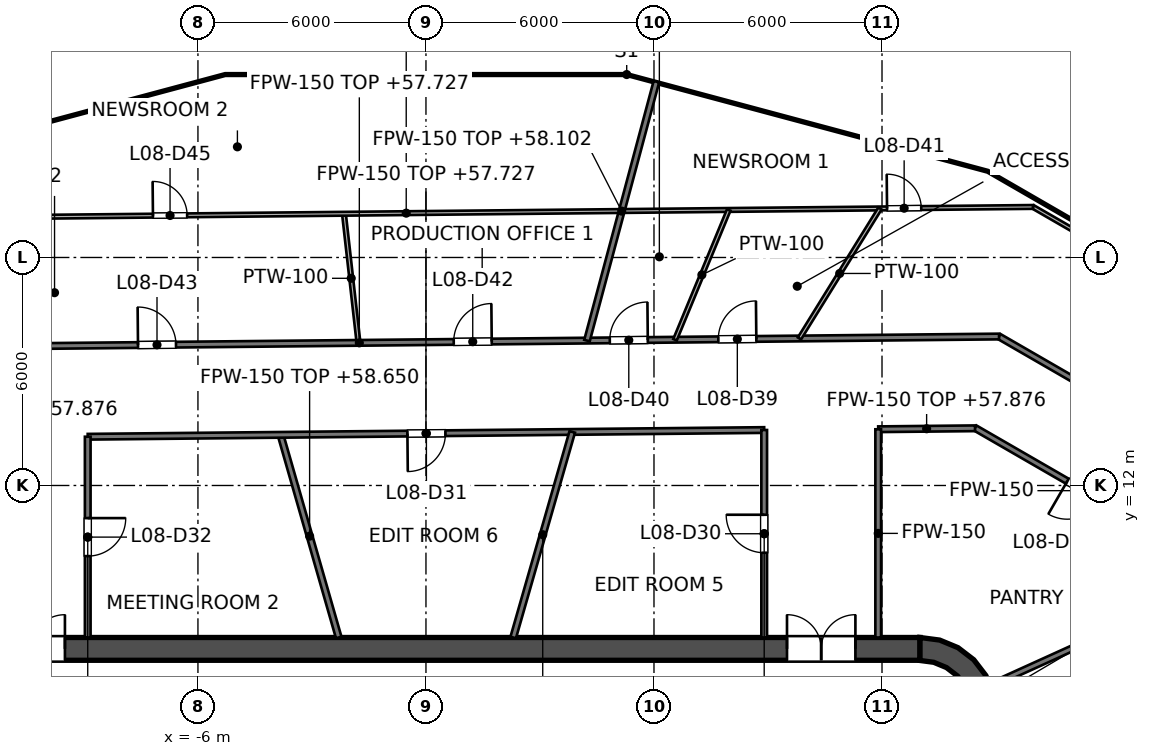
"""IFC4 building model, lengths in metres.
Left out: names, types, materials, properties, quantities, classifications, styles, units other than length and angle.
Written with IfcOpenShell. Run it as: python <this file> out.ifc"""

import sys

from ifc_helpers import new_model, si_unit, direction, frame, frame_2d, origin, place, context, subcontext, project, spatial, polyline, rectangle, outline, extrude, element, fill, save


model = new_model("IFC4")
c1 = context("Model", 3, precision=1e-05, world=origin(), true_north=direction((0.0, 1.0)))
c2 = subcontext(c1, "Body", "Model", "MODEL_VIEW")
j1 = project(units=[si_unit("LENGTHUNIT", "METRE"), si_unit("PLANEANGLEUNIT", "RADIAN")], contexts=[c1])
p1 = place(None, origin())
s1 = spatial("IfcSite", under=j1, at=p1, CompositionType="ELEMENT")
p2 = place(p1, origin())
s2 = spatial("IfcBuilding", under=s1, at=p2, CompositionType="ELEMENT")
p3 = place(p2, frame((0.0, 0.0, 54.6)))
s3 = spatial("IfcBuildingStorey", under=s2, at=p3, CompositionType="ELEMENT", Elevation=54.6)
p4 = place(p3, frame((-13.0, 7.7, 0.0), z_axis=(0.0, 0.0, 1.0), x_axis=(1.0, 0.0, 0.0)))
e1 = element("IfcWall", 1, at=p4, inside=s3, PredefinedType="SHEAR", context=c2, shape_type="SweptSolid", body=[
    extrude(rectangle(XDim=26.0, YDim=0.6, at=frame_2d((13.0, 0.0))), origin(), (0.0, 0.0, 1.0), 4.2),
])
p5 = place(p4, frame((1.7, 0.0, 0.0)))
e2 = element("IfcOpeningElement", 2, at=p5, cuts=e1, PredefinedType="OPENING", context=c2, shape_type="SweptSolid", body=[
    extrude(rectangle(XDim=1.8, YDim=2.1, at=frame_2d((0.9, 1.05))), frame((0.0, 0.3, 0.0), z_axis=(0.0, -1.0, 0.0), x_axis=(1.0, 0.0, 0.0)), (0.0, 0.0, 1.0), 0.6),
])
p6 = place(p4, frame((22.5, 0.0, 0.0)))
e3 = element("IfcOpeningElement", 3, at=p6, cuts=e1, PredefinedType="OPENING", context=c2, shape_type="SweptSolid", body=[
    extrude(rectangle(XDim=1.8, YDim=2.1, at=frame_2d((0.9, 1.05))), frame((0.0, 0.3, 0.0), z_axis=(0.0, -1.0, 0.0), x_axis=(1.0, 0.0, 0.0)), (0.0, 0.0, 1.0), 0.6),
])
p7 = place(p3, origin())
e4 = element("IfcWall", 4, at=p7, inside=s3, PredefinedType="SHEAR", context=c2, shape_type="SweptSolid", body=[
    extrude(outline(polyline([(13.0, 8.0), (13.0, 7.395), (13.361, 7.347), (13.698, 7.208), (13.986, 6.986), (14.208, 6.698), (14.347, 6.361), (14.395, 6.0), (15.0, 6.0), (14.932, 6.518), (14.732, 7.0), (14.414, 7.414), (14.0, 7.732), (13.518, 7.932), (13.0, 8.0)])), origin(), (0.0, 0.0, 1.0), 4.2),
])
p8 = place(p3, frame((-9.125, 7.0, 0.0), z_axis=(0.0, 0.0, 1.0), x_axis=(1.0, 0.0, 0.0)))
e5 = element("IfcWall", 5, at=p8, inside=s3, PredefinedType="SOLIDWALL", context=c2, shape_type="SweptSolid", body=[
    extrude(rectangle(XDim=18.25, YDim=0.8, at=frame_2d((9.125, 0.0))), origin(), (0.0, 0.0, 1.0), 4.05),
])
p9 = place(p3, frame((11.8, -7.4, 0.0), z_axis=(0.0, 0.0, 1.0), x_axis=(0.0, 1.0, 0.0)))
e6 = element("IfcWall", 6, at=p9, inside=s3, PredefinedType="SOLIDWALL", context=c2, shape_type="SweptSolid", body=[
    extrude(rectangle(XDim=14.8, YDim=0.4, at=frame_2d((7.4, 0.0))), origin(), (0.0, 0.0, 1.0), 4.05),
])
p10 = place(p9, frame((11.2, 0.0, 0.0)))
e7 = element("IfcOpeningElement", 7, at=p10, cuts=e6, PredefinedType="OPENING", context=c2, shape_type="SweptSolid", body=[
    extrude(rectangle(XDim=1.1, YDim=2.1, at=frame_2d((0.55, 1.05))), frame((0.0, 0.2, 0.0), z_axis=(0.0, -1.0, 0.0), x_axis=(1.0, 0.0, 0.0)), (0.0, 0.0, 1.0), 0.4),
])
p11 = place(p9, frame((8.3, 0.0, 0.0)))
e8 = element("IfcOpeningElement", 8, at=p11, cuts=e6, PredefinedType="OPENING", context=c2, shape_type="SweptSolid", body=[
    extrude(rectangle(XDim=1.1, YDim=2.1, at=frame_2d((0.55, 1.05))), frame((0.0, 0.2, 0.0), z_axis=(0.0, -1.0, 0.0), x_axis=(1.0, 0.0, 0.0)), (0.0, 0.0, 1.0), 0.4),
])
p12 = place(p9, frame((5.4, 0.0, 0.0)))
e9 = element("IfcOpeningElement", 9, at=p12, cuts=e6, PredefinedType="OPENING", context=c2, shape_type="SweptSolid", body=[
    extrude(rectangle(XDim=1.1, YDim=2.1, at=frame_2d((0.55, 1.05))), frame((0.0, 0.2, 0.0), z_axis=(0.0, -1.0, 0.0), x_axis=(1.0, 0.0, 0.0)), (0.0, 0.0, 1.0), 0.4),
])
p13 = place(p9, frame((13.552, 0.0, 0.0)))
e10 = element("IfcOpeningElement", 10, at=p13, cuts=e6, PredefinedType="OPENING", context=c2, shape_type="SweptSolid", body=[
    extrude(rectangle(XDim=0.9, YDim=2.1, at=frame_2d((0.45, 1.05))), frame((0.0, 0.2, 0.0), z_axis=(0.0, -1.0, 0.0), x_axis=(1.0, 0.0, 0.0)), (0.0, 0.0, 1.0), 0.4),
])
p14 = place(p9, frame((0.347, 0.0, 0.0)))
e11 = element("IfcOpeningElement", 11, at=p14, cuts=e6, PredefinedType="OPENING", context=c2, shape_type="SweptSolid", body=[
    extrude(rectangle(XDim=0.9, YDim=2.1, at=frame_2d((0.45, 1.05))), frame((0.0, 0.2, 0.0), z_axis=(0.0, -1.0, 0.0), x_axis=(1.0, 0.0, 0.0)), (0.0, 0.0, 1.0), 0.4),
])
p15 = place(p3, frame((-3.827, 13.333, 0.0), z_axis=(0.0, 0.0, 1.0), x_axis=(0.275935525478, -0.961176147113, 0.0)))
e12 = element("IfcWall", 12, at=p15, inside=s3, PredefinedType="PARTITIONING", context=c2, shape_type="SweptSolid", body=[
    extrude(rectangle(XDim=5.548, YDim=0.15, at=frame_2d((2.774, 0.0))), origin(), (0.0, 0.0, 1.0), 4.05),
])
p16 = place(p3, frame((14.448, 13.515, 0.0), z_axis=(0.0, 0.0, 1.0), x_axis=(0.865975016585, -0.500087263036, 0.0)))
e13 = element("IfcWall", 13, at=p16, inside=s3, PredefinedType="PARTITIONING", context=c2, shape_type="SweptSolid", body=[
    extrude(rectangle(XDim=6.604, YDim=0.15, at=frame_2d((3.302, 0.0))), origin(), (0.0, 0.0, 1.0), 3.195),
])
p17 = place(p16, frame((2.804, 0.0, 0.0)))
e14 = element("IfcOpeningElement", 14, at=p17, cuts=e13, PredefinedType="OPENING", context=c2, shape_type="SweptSolid", body=[
    extrude(rectangle(XDim=1.0, YDim=2.1, at=frame_2d((0.5, 1.05))), frame((0.0, 0.075, 0.0), z_axis=(0.0, -1.0, 0.0), x_axis=(1.0, 0.0, 0.0)), (0.0, 0.0, 1.0), 0.15),
])
p18 = place(p3, frame((15.08, 15.921, 0.0), z_axis=(0.0, 0.0, 1.0), x_axis=(0.865969836028, -0.500096233828, 0.0)))
e15 = element("IfcWall", 15, at=p18, inside=s3, PredefinedType="PARTITIONING", context=c2, shape_type="SweptSolid", body=[
    extrude(rectangle(XDim=8.613, YDim=0.15, at=frame_2d((4.306, 0.0))), origin(), (0.0, 0.0, 1.0), 3.195),
])
p19 = place(p18, frame((3.409, 0.0, 0.0)))
e16 = element("IfcOpeningElement", 16, at=p19, cuts=e15, PredefinedType="OPENING", context=c2, shape_type="SweptSolid", body=[
    extrude(rectangle(XDim=1.2, YDim=2.1, at=frame_2d((0.6, 1.05))), frame((0.0, 0.075, 0.0), z_axis=(0.0, -1.0, 0.0), x_axis=(1.0, 0.0, 0.0)), (0.0, 0.0, 1.0), 0.15),
])
p20 = place(p3, frame((-8.9, 13.282, 0.0), z_axis=(0.0, 0.0, 1.0), x_axis=(0.999950834077, 0.009916119672, 0.0)))
e17 = element("IfcWall", 17, at=p20, inside=s3, PredefinedType="PARTITIONING", context=c2, shape_type="SweptSolid", body=[
    extrude(rectangle(XDim=17.801, YDim=0.15, at=frame_2d((8.9, 0.0))), origin(), (0.0, 0.0, 1.0), 3.127),
])
p21 = place(p20, frame((8.412, 0.0, 0.0)))
e18 = element("IfcOpeningElement", 18, at=p21, cuts=e17, PredefinedType="OPENING", context=c2, shape_type="SweptSolid", body=[
    extrude(rectangle(XDim=1.0, YDim=2.1, at=frame_2d((0.5, 1.05))), frame((0.0, 0.075, 0.0), z_axis=(0.0, -1.0, 0.0), x_axis=(1.0, 0.0, 0.0)), (0.0, 0.0, 1.0), 0.15),
])
p22 = place(p3, frame((11.9, 13.48, 0.0), z_axis=(0.0, 0.0, 1.0), x_axis=(0.999950357576, 0.009964054536, 0.0)))
e19 = element("IfcWall", 19, at=p22, inside=s3, PredefinedType="PARTITIONING", context=c2, shape_type="SweptSolid", body=[
    extrude(rectangle(XDim=2.548, YDim=0.15, at=frame_2d((1.274, 0.0))), origin(), (0.0, 0.0, 1.0), 3.276),
])
p23 = place(p3, frame((-18.587, 15.586, 0.0), z_axis=(0.0, 0.0, 1.0), x_axis=(0.99995087003, 0.009912493396, 0.0)))
e20 = element("IfcWall", 20, at=p23, inside=s3, PredefinedType="PARTITIONING", context=c2, shape_type="SweptSolid", body=[
    extrude(rectangle(XDim=33.669, YDim=0.15, at=frame_2d((16.834, 0.0))), origin(), (0.0, 0.0, 1.0), 3.127),
])
p24 = place(p23, frame((26.281, 0.0, 0.0)))
e21 = element("IfcOpeningElement", 21, at=p24, cuts=e20, PredefinedType="OPENING", context=c2, shape_type="SweptSolid", body=[
    extrude(rectangle(XDim=1.0, YDim=2.1, at=frame_2d((0.5, 1.05))), frame((0.0, 0.075, 0.0), z_axis=(0.0, -1.0, 0.0), x_axis=(1.0, 0.0, 0.0)), (0.0, 0.0, 1.0), 0.15),
])
p25 = place(p23, frame((23.425, 0.0, 0.0)))
e22 = element("IfcOpeningElement", 22, at=p25, cuts=e20, PredefinedType="OPENING", context=c2, shape_type="SweptSolid", body=[
    extrude(rectangle(XDim=1.0, YDim=2.1, at=frame_2d((0.5, 1.05))), frame((0.0, 0.075, 0.0), z_axis=(0.0, -1.0, 0.0), x_axis=(1.0, 0.0, 0.0)), (0.0, 0.0, 1.0), 0.15),
])
p26 = place(p23, frame((19.319, 0.0, 0.0)))
e23 = element("IfcOpeningElement", 23, at=p26, cuts=e20, PredefinedType="OPENING", context=c2, shape_type="SweptSolid", body=[
    extrude(rectangle(XDim=1.0, YDim=2.1, at=frame_2d((0.5, 1.05))), frame((0.0, 0.075, 0.0), z_axis=(0.0, -1.0, 0.0), x_axis=(1.0, 0.0, 0.0)), (0.0, 0.0, 1.0), 0.15),
])
p27 = place(p23, frame((11.01, 0.0, 0.0)))
e24 = element("IfcOpeningElement", 24, at=p27, cuts=e20, PredefinedType="OPENING", context=c2, shape_type="SweptSolid", body=[
    extrude(rectangle(XDim=1.0, YDim=2.1, at=frame_2d((0.5, 1.05))), frame((0.0, 0.075, 0.0), z_axis=(0.0, -1.0, 0.0), x_axis=(1.0, 0.0, 0.0)), (0.0, 0.0, 1.0), 0.15),
])
p28 = place(p23, frame((2.504, 0.0, 0.0)))
e25 = element("IfcOpeningElement", 25, at=p28, cuts=e20, PredefinedType="OPENING", context=c2, shape_type="SweptSolid", body=[
    extrude(rectangle(XDim=1.0, YDim=2.1, at=frame_2d((0.5, 1.05))), frame((0.0, 0.075, 0.0), z_axis=(0.0, -1.0, 0.0), x_axis=(1.0, 0.0, 0.0)), (0.0, 0.0, 1.0), 0.15),
])
p29 = place(p3, frame((14.843, 6.733, 0.0), z_axis=(0.0, 0.0, 1.0), x_axis=(0.910628361306, 0.413226315214, 0.0)))
e26 = element("IfcWall", 26, at=p29, inside=s3, PredefinedType="PARTITIONING", context=c2, shape_type="SweptSolid", body=[
    extrude(rectangle(XDim=5.87, YDim=0.15, at=frame_2d((2.935, 0.0))), origin(), (0.0, 0.0, 1.0), 4.05),
])
p30 = place(p3, frame((2.296, 8.0, 0.0), z_axis=(0.0, 0.0, 1.0), x_axis=(0.275958345059, 0.961169595749, 0.0)))
e27 = element("IfcWall", 27, at=p30, inside=s3, PredefinedType="PARTITIONING", context=c2, shape_type="SweptSolid", body=[
    extrude(rectangle(XDim=5.628, YDim=0.15, at=frame_2d((2.814, 0.0))), origin(), (0.0, 0.0, 1.0), 4.05),
])
p31 = place(p3, frame((4.237, 15.813, 0.0), z_axis=(0.0, 0.0, 1.0), x_axis=(0.258871033447, 0.965911894555, 0.0)))
e28 = element("IfcWall", 28, at=p31, inside=s3, PredefinedType="PARTITIONING", context=c2, shape_type="SweptSolid", body=[
    extrude(rectangle(XDim=7.053, YDim=0.15, at=frame_2d((3.527, 0.0))), origin(), (0.0, 0.0, 1.0), 3.501),
])
p32 = place(p3, frame((11.9, 8.0, 0.0), z_axis=(0.0, 0.0, 1.0), x_axis=(0.0, 1.0, 0.0)))
e29 = element("IfcWall", 29, at=p32, inside=s3, PredefinedType="PARTITIONING", context=c2, shape_type="SweptSolid", body=[
    extrude(rectangle(XDim=5.479, YDim=0.15, at=frame_2d((2.74, 0.0))), origin(), (0.0, 0.0, 1.0), 3.195),
])
p33 = place(p3, frame((8.9, 8.0, 0.0), z_axis=(0.0, 0.0, 1.0), x_axis=(0.0, 1.0, 0.0)))
e30 = element("IfcWall", 30, at=p33, inside=s3, PredefinedType="PARTITIONING", context=c2, shape_type="SweptSolid", body=[
    extrude(rectangle(XDim=5.46, YDim=0.15, at=frame_2d((2.73, 0.0))), origin(), (0.0, 0.0, 1.0), 3.127),
])
p34 = place(p33, frame((2.23, 0.0, 0.0)))
e31 = element("IfcOpeningElement", 31, at=p34, cuts=e30, PredefinedType="OPENING", context=c2, shape_type="SweptSolid", body=[
    extrude(rectangle(XDim=1.0, YDim=2.1, at=frame_2d((0.5, 1.05))), frame((0.0, 0.075, 0.0), z_axis=(0.0, -1.0, 0.0), x_axis=(1.0, 0.0, 0.0)), (0.0, 0.0, 1.0), 0.15),
])
p35 = place(p3, frame((-8.9, 8.0, 0.0), z_axis=(0.0, 0.0, 1.0), x_axis=(0.0, 1.0, 0.0)))
e32 = element("IfcWall", 32, at=p35, inside=s3, PredefinedType="PARTITIONING", context=c2, shape_type="SweptSolid", body=[
    extrude(rectangle(XDim=5.283, YDim=0.15, at=frame_2d((2.642, 0.0))), origin(), (0.0, 0.0, 1.0), 3.127),
])
p36 = place(p35, frame((2.142, 0.0, 0.0)))
e33 = element("IfcOpeningElement", 33, at=p36, cuts=e32, PredefinedType="OPENING", context=c2, shape_type="SweptSolid", body=[
    extrude(rectangle(XDim=1.0, YDim=2.1, at=frame_2d((0.5, 1.05))), frame((0.0, 0.075, 0.0), z_axis=(0.0, -1.0, 0.0), x_axis=(1.0, 0.0, 0.0)), (0.0, 0.0, 1.0), 0.15),
])
p37 = place(p3, frame((-2.158, 19.15, 0.0), z_axis=(0.0, 0.0, 1.0), x_axis=(0.112085765887, -0.993698536321, 0.0)))
e34 = element("IfcWall", 34, at=p37, inside=s3, PredefinedType="PARTITIONING", context=c2, shape_type="SweptSolid", body=[
    extrude(rectangle(XDim=3.417, YDim=0.1, at=frame_2d((1.709, 0.0))), origin(), (0.0, 0.0, 1.0), 4.05),
])
p38 = place(p3, frame((15.975, 19.33, 0.0), z_axis=(0.0, 0.0, 1.0), x_axis=(0.866006425355, -0.500032870163, 0.0)))
e35 = element("IfcWall", 35, at=p38, inside=s3, PredefinedType="PARTITIONING", context=c2, shape_type="SweptSolid", body=[
    extrude(rectangle(XDim=7.58, YDim=0.1, at=frame_2d((3.79, 0.0))), origin(), (0.0, 0.0, 1.0), 3.195),
])
p39 = place(p3, frame((-17.014, 19.003, 0.0), z_axis=(0.0, 0.0, 1.0), x_axis=(0.99995097792, 0.009901603787, 0.0)))
e36 = element("IfcWall", 36, at=p39, inside=s3, PredefinedType="PARTITIONING", context=c2, shape_type="SweptSolid", body=[
    extrude(rectangle(XDim=32.991, YDim=0.1, at=frame_2d((16.495, 0.0))), origin(), (0.0, 0.0, 1.0), 3.127),
])
p40 = place(p39, frame((29.148, 0.0, 0.0)))
e37 = element("IfcOpeningElement", 37, at=p40, cuts=e36, PredefinedType="OPENING", context=c2, shape_type="SweptSolid", body=[
    extrude(rectangle(XDim=0.9, YDim=2.1, at=frame_2d((0.45, 1.05))), frame((0.0, 0.05, 0.0), z_axis=(0.0, -1.0, 0.0), x_axis=(1.0, 0.0, 0.0)), (0.0, 0.0, 1.0), 0.1),
])
p41 = place(p39, frame((9.831, 0.0, 0.0)))
e38 = element("IfcOpeningElement", 38, at=p41, cuts=e36, PredefinedType="OPENING", context=c2, shape_type="SweptSolid", body=[
    extrude(rectangle(XDim=0.9, YDim=2.1, at=frame_2d((0.45, 1.05))), frame((0.0, 0.05, 0.0), z_axis=(0.0, -1.0, 0.0), x_axis=(1.0, 0.0, 0.0)), (0.0, 0.0, 1.0), 0.1),
])
p42 = place(p3, frame((9.827, 15.869, 0.0), z_axis=(0.0, 0.0, 1.0), x_axis=(0.526586421173, 0.850121603675, 0.0)))
e39 = element("IfcWall", 39, at=p42, inside=s3, PredefinedType="PARTITIONING", context=c2, shape_type="SweptSolid", body=[
    extrude(rectangle(XDim=4.024, YDim=0.1, at=frame_2d((2.012, 0.0))), origin(), (0.0, 0.0, 1.0), 4.05),
])
p43 = place(p3, frame((6.554, 15.836, 0.0), z_axis=(0.0, 0.0, 1.0), x_axis=(0.382344013287, 0.924020051462, 0.0)))
e40 = element("IfcWall", 40, at=p43, inside=s3, PredefinedType="PARTITIONING", context=c2, shape_type="SweptSolid", body=[
    extrude(rectangle(XDim=3.696, YDim=0.1, at=frame_2d((1.848, 0.0))), origin(), (0.0, 0.0, 1.0), 4.05),
])
p44 = place(p13, origin())
e41 = element("IfcDoor", 41, at=p44, inside=s3, OperationType="SINGLE_SWING_RIGHT", PredefinedType="DOOR", context=c2, shape_type="SweptSolid", body=[
    extrude(rectangle(XDim=0.9, YDim=2.1, at=frame_2d((0.45, 1.05))), frame((0.0, 0.025, 0.0), z_axis=(0.0, -1.0, 0.0), x_axis=(1.0, 0.0, 0.0)), (0.0, 0.0, 1.0), 0.05),
])
fill(e10, e41)
p45 = place(p5, origin())
e42 = element("IfcDoor", 42, at=p45, inside=s3, OperationType="DOUBLE_DOOR_SINGLE_SWING", PredefinedType="DOOR", context=c2, shape_type="SweptSolid", body=[
    extrude(rectangle(XDim=1.8, YDim=2.1, at=frame_2d((0.9, 1.05))), frame((0.0, 0.025, 0.0), z_axis=(0.0, -1.0, 0.0), x_axis=(1.0, 0.0, 0.0)), (0.0, 0.0, 1.0), 0.05),
])
fill(e2, e42)
p46 = place(p6, origin())
e43 = element("IfcDoor", 43, at=p46, inside=s3, OperationType="DOUBLE_DOOR_SINGLE_SWING", PredefinedType="DOOR", context=c2, shape_type="SweptSolid", body=[
    extrude(rectangle(XDim=1.8, YDim=2.1, at=frame_2d((0.9, 1.05))), frame((0.0, 0.025, 0.0), z_axis=(0.0, -1.0, 0.0), x_axis=(1.0, 0.0, 0.0)), (0.0, 0.0, 1.0), 0.05),
])
fill(e3, e43)
p47 = place(p17, origin())
e44 = element("IfcDoor", 44, at=p47, inside=s3, OperationType="SINGLE_SWING_LEFT", PredefinedType="DOOR", context=c2, shape_type="SweptSolid", body=[
    extrude(rectangle(XDim=1.0, YDim=2.1, at=frame_2d((0.5, 1.05))), frame((0.0, 0.025, 0.0), z_axis=(0.0, -1.0, 0.0), x_axis=(1.0, 0.0, 0.0)), (0.0, 0.0, 1.0), 0.05),
])
fill(e14, e44)
p48 = place(p34, origin())
e45 = element("IfcDoor", 45, at=p48, inside=s3, OperationType="SINGLE_SWING_RIGHT", PredefinedType="DOOR", context=c2, shape_type="SweptSolid", body=[
    extrude(rectangle(XDim=1.0, YDim=2.1, at=frame_2d((0.5, 1.05))), frame((0.0, 0.025, 0.0), z_axis=(0.0, -1.0, 0.0), x_axis=(1.0, 0.0, 0.0)), (0.0, 0.0, 1.0), 0.05),
])
fill(e31, e45)
p49 = place(p21, origin())
e46 = element("IfcDoor", 46, at=p49, inside=s3, OperationType="SINGLE_SWING_LEFT", PredefinedType="DOOR", context=c2, shape_type="SweptSolid", body=[
    extrude(rectangle(XDim=1.0, YDim=2.1, at=frame_2d((0.5, 1.05))), frame((0.0, 0.025, 0.0), z_axis=(0.0, -1.0, 0.0), x_axis=(1.0, 0.0, 0.0)), (0.0, 0.0, 1.0), 0.05),
])
fill(e18, e46)
p50 = place(p36, origin())
e47 = element("IfcDoor", 47, at=p50, inside=s3, OperationType="SINGLE_SWING_RIGHT", PredefinedType="DOOR", context=c2, shape_type="SweptSolid", body=[
    extrude(rectangle(XDim=1.0, YDim=2.1, at=frame_2d((0.5, 1.05))), frame((0.0, 0.025, 0.0), z_axis=(0.0, -1.0, 0.0), x_axis=(1.0, 0.0, 0.0)), (0.0, 0.0, 1.0), 0.05),
])
fill(e33, e47)
p51 = place(p24, origin())
e48 = element("IfcDoor", 48, at=p51, inside=s3, OperationType="SINGLE_SWING_RIGHT", PredefinedType="DOOR", context=c2, shape_type="SweptSolid", body=[
    extrude(rectangle(XDim=1.0, YDim=2.1, at=frame_2d((0.5, 1.05))), frame((0.0, 0.025, 0.0), z_axis=(0.0, -1.0, 0.0), x_axis=(1.0, 0.0, 0.0)), (0.0, 0.0, 1.0), 0.05),
])
fill(e21, e48)
p52 = place(p25, origin())
e49 = element("IfcDoor", 49, at=p52, inside=s3, OperationType="SINGLE_SWING_RIGHT", PredefinedType="DOOR", context=c2, shape_type="SweptSolid", body=[
    extrude(rectangle(XDim=1.0, YDim=2.1, at=frame_2d((0.5, 1.05))), frame((0.0, 0.025, 0.0), z_axis=(0.0, -1.0, 0.0), x_axis=(1.0, 0.0, 0.0)), (0.0, 0.0, 1.0), 0.05),
])
fill(e22, e49)
p53 = place(p40, origin())
e50 = element("IfcDoor", 50, at=p53, inside=s3, OperationType="SINGLE_SWING_LEFT", PredefinedType="DOOR", context=c2, shape_type="SweptSolid", body=[
    extrude(rectangle(XDim=0.9, YDim=2.1, at=frame_2d((0.45, 1.05))), frame((0.0, 0.025, 0.0), z_axis=(0.0, -1.0, 0.0), x_axis=(1.0, 0.0, 0.0)), (0.0, 0.0, 1.0), 0.05),
])
fill(e37, e50)
p54 = place(p26, origin())
e51 = element("IfcDoor", 51, at=p54, inside=s3, OperationType="SINGLE_SWING_RIGHT", PredefinedType="DOOR", context=c2, shape_type="SweptSolid", body=[
    extrude(rectangle(XDim=1.0, YDim=2.1, at=frame_2d((0.5, 1.05))), frame((0.0, 0.025, 0.0), z_axis=(0.0, -1.0, 0.0), x_axis=(1.0, 0.0, 0.0)), (0.0, 0.0, 1.0), 0.05),
])
fill(e23, e51)
p55 = place(p27, origin())
e52 = element("IfcDoor", 52, at=p55, inside=s3, OperationType="SINGLE_SWING_LEFT", PredefinedType="DOOR", context=c2, shape_type="SweptSolid", body=[
    extrude(rectangle(XDim=1.0, YDim=2.1, at=frame_2d((0.5, 1.05))), frame((0.0, 0.025, 0.0), z_axis=(0.0, -1.0, 0.0), x_axis=(1.0, 0.0, 0.0)), (0.0, 0.0, 1.0), 0.05),
])
fill(e24, e52)
p56 = place(p41, origin())
e53 = element("IfcDoor", 53, at=p56, inside=s3, OperationType="SINGLE_SWING_LEFT", PredefinedType="DOOR", context=c2, shape_type="SweptSolid", body=[
    extrude(rectangle(XDim=0.9, YDim=2.1, at=frame_2d((0.45, 1.05))), frame((0.0, 0.025, 0.0), z_axis=(0.0, -1.0, 0.0), x_axis=(1.0, 0.0, 0.0)), (0.0, 0.0, 1.0), 0.05),
])
fill(e38, e53)
save(model, sys.argv[1])
